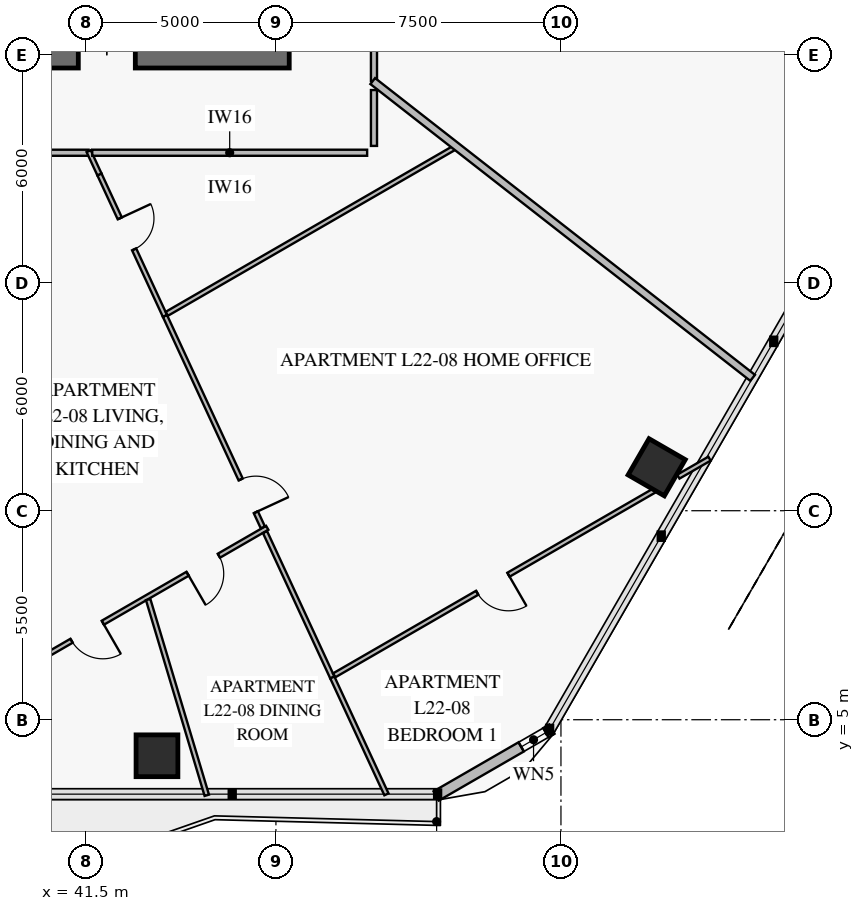
"""IFC4 building model, lengths in metres.
Left out: names, types, materials, properties, quantities, classifications, styles, units other than length and angle.
Written with IfcOpenShell. Run it as: python <this file> out.ifc"""

import sys

from ifc_helpers import new_model, si_unit, direction, frame, frame_2d, origin, origin_2d, place, context, subcontext, project, spatial, rectangle, extrude, element, fill, save


model = new_model("IFC4")
c1 = context("Model", 3, precision=1e-05, world=origin(), true_north=direction((0.0, 1.0)))
c2 = subcontext(c1, "Body", "Model", "MODEL_VIEW")
j1 = project(units=[si_unit("LENGTHUNIT", "METRE"), si_unit("PLANEANGLEUNIT", "RADIAN")], contexts=[c1])
p1 = place(None, origin())
s1 = spatial("IfcSite", under=j1, at=p1, CompositionType="ELEMENT")
p2 = place(p1, origin())
s2 = spatial("IfcBuilding", under=s1, at=p2, CompositionType="ELEMENT")
p3 = place(p2, frame((0.0, 0.0, 92.4)))
s3 = spatial("IfcBuildingStorey", under=s2, at=p3, CompositionType="ELEMENT", Elevation=92.4)
p4 = place(p3, frame((37.35, 22.5, 0.0), z_axis=(0.0, 0.0, 1.0), x_axis=(1.0, 0.0, 0.0)))
e1 = element("IfcWall", 1, at=p4, inside=s3, PredefinedType="SHEAR", context=c2, shape_type="SweptSolid", body=[
    extrude(rectangle(XDim=9.5, YDim=0.7, at=frame_2d((4.75, 0.0))), origin(), (0.0, 0.0, 1.0), 3.8),
])
p5 = place(p4, frame((3.95, 0.0, 0.0)))
e2 = element("IfcOpeningElement", 2, at=p5, cuts=e1, PredefinedType="OPENING", context=c2, shape_type="SweptSolid", body=[
    extrude(rectangle(XDim=1.5, YDim=2.15, at=frame_2d((0.75, 1.075))), frame((0.0, 0.362, 0.0), z_axis=(0.0, -1.0, 0.0), x_axis=(1.0, 0.0, 0.0)), (0.0, 0.0, 1.0), 0.724),
])
for number, where, z_axis, x_axis in (
    (3, (43.37, 4.052, 0.0), (0.0, 0.0, 1.0), (1.0, 0.0, 0.0)),
    (4, (56.519, 11.643, 0.0), (0.0, 0.0, 1.0), (0.5, 0.866, 0.0)),
):
    element("IfcColumn", number, at=place(p3, frame(where, z_axis=z_axis, x_axis=x_axis)), inside=s3, PredefinedType="COLUMN", context=c2, shape_type="SweptSolid", body=[
        extrude(rectangle(XDim=1.1, YDim=1.1, at=origin_2d()), origin(), (0.0, 0.0, 1.0), 3.55),
    ])
p6 = place(p3, frame((53.761, 4.751, 0.0), z_axis=(0.0, 0.0, 1.0), x_axis=(-0.866007452331, -0.500031091541, 0.0)))
e5 = element("IfcWall", 5, at=p6, inside=s3, PredefinedType="SOLIDWALL", context=c2, shape_type="SweptSolid", body=[
    extrude(rectangle(XDim=3.515, YDim=0.28, at=frame_2d((1.757, 0.0))), origin(), (0.0, 0.0, 1.0), 3.55),
])
p7 = place(p6, frame((0.182, 0.0, 0.85)))
e6 = element("IfcOpeningElement", 6, at=p7, cuts=e5, PredefinedType="OPENING", context=c2, shape_type="SweptSolid", body=[
    extrude(rectangle(XDim=0.75, YDim=1.5, at=frame_2d((0.375, 0.75))), frame((0.0, 0.152, 0.0), z_axis=(0.0, -1.0, 0.0), x_axis=(1.0, 0.0, 0.0)), (0.0, 0.0, 1.0), 0.304),
])
p8 = place(p3, frame((39.743, 6.281, 0.0), z_axis=(0.0, 0.0, 1.0), x_axis=(0.866016234862, 0.500015880704, 0.0)))
e7 = element("IfcWall", 7, at=p8, inside=s3, PredefinedType="PARTITIONING", context=c2, shape_type="SweptSolid", body=[
    extrude(rectangle(XDim=7.538, YDim=0.12, at=frame_2d((3.769, 0.0))), origin(), (0.0, 0.0, 1.0), 2.85),
])
p9 = place(p8, frame((1.594, 0.0, 0.0)))
e8 = element("IfcOpeningElement", 8, at=p9, cuts=e7, PredefinedType="OPENING", context=c2, shape_type="SweptSolid", body=[
    extrude(rectangle(XDim=0.95, YDim=2.1, at=frame_2d((0.475, 1.05))), frame((0.0, 0.072, 0.0), z_axis=(0.0, -1.0, 0.0), x_axis=(1.0, 0.0, 0.0)), (0.0, 0.0, 1.0), 0.144),
])
p10 = place(p8, frame((5.12, 0.0, 0.0)))
e9 = element("IfcOpeningElement", 9, at=p10, cuts=e7, PredefinedType="OPENING", context=c2, shape_type="SweptSolid", body=[
    extrude(rectangle(XDim=0.95, YDim=2.1, at=frame_2d((0.475, 1.05))), frame((0.0, 0.072, 0.0), z_axis=(0.0, -1.0, 0.0), x_axis=(1.0, 0.0, 0.0)), (0.0, 0.0, 1.0), 0.144),
])
p11 = place(p3, frame((41.856, 19.35, 0.0), z_axis=(0.0, 0.0, 1.0), x_axis=(0.420102705712, -0.907476565347, 0.0)))
e10 = element("IfcWall", 10, at=p11, inside=s3, PredefinedType="PARTITIONING", context=c2, shape_type="SweptSolid", body=[
    extrude(rectangle(XDim=4.105, YDim=0.12, at=frame_2d((2.052, 0.0))), origin(), (0.0, 0.0, 1.0), 3.55),
])
p12 = place(p11, frame((1.274, 0.0, 0.0)))
e11 = element("IfcOpeningElement", 11, at=p12, cuts=e10, PredefinedType="OPENING", context=c2, shape_type="SweptSolid", body=[
    extrude(rectangle(XDim=0.9, YDim=2.1, at=frame_2d((0.45, 1.05))), frame((0.0, 0.072, 0.0), z_axis=(0.0, -1.0, 0.0), x_axis=(1.0, 0.0, 0.0)), (0.0, 0.0, 1.0), 0.144),
])
p13 = place(p3, frame((43.58, 15.625, 0.0), z_axis=(0.0, 0.0, 1.0), x_axis=(0.420105955841, -0.907475060741, 0.0)))
e12 = element("IfcWall", 12, at=p13, inside=s3, PredefinedType="PARTITIONING", context=c2, shape_type="SweptSolid", body=[
    extrude(rectangle(XDim=6.13, YDim=0.12, at=frame_2d((3.065, 0.0))), origin(), (0.0, 0.0, 1.0), 3.1),
])
p14 = place(p13, frame((4.742, 0.0, 0.0)))
e13 = element("IfcOpeningElement", 13, at=p14, cuts=e12, PredefinedType="OPENING", context=c2, shape_type="SweptSolid", body=[
    extrude(rectangle(XDim=0.95, YDim=2.1, at=frame_2d((0.475, 1.05))), frame((0.0, 0.072, 0.0), z_axis=(0.0, -1.0, 0.0), x_axis=(1.0, 0.0, 0.0)), (0.0, 0.0, 1.0), 0.144),
])
p15 = place(p3, frame((46.213, 9.938, 0.0), z_axis=(0.0, 0.0, 1.0), x_axis=(0.420052931111, -0.907499606096, 0.0)))
e14 = element("IfcWall", 14, at=p15, inside=s3, PredefinedType="PARTITIONING", context=c2, shape_type="SweptSolid", body=[
    extrude(rectangle(XDim=4.217, YDim=0.12, at=frame_2d((2.108, 0.0))), origin(), (0.0, 0.0, 1.0), 2.8),
])
p16 = place(p3, frame((48.033, 6.168, 0.0), z_axis=(0.0, 0.0, 1.0), x_axis=(0.866038464595, 0.49997737733, 0.0)))
e15 = element("IfcWall", 15, at=p16, inside=s3, PredefinedType="PARTITIONING", context=c2, shape_type="SweptSolid", body=[
    extrude(rectangle(XDim=9.81, YDim=0.12, at=frame_2d((4.905, 0.0))), origin(), (0.0, 0.0, 1.0), 3.55),
])
p17 = place(p16, frame((4.346, 0.0, 0.0)))
e16 = element("IfcOpeningElement", 16, at=p17, cuts=e15, PredefinedType="OPENING", context=c2, shape_type="SweptSolid", body=[
    extrude(rectangle(XDim=0.95, YDim=2.1, at=frame_2d((0.475, 1.05))), frame((0.0, 0.072, 0.0), z_axis=(0.0, -1.0, 0.0), x_axis=(1.0, 0.0, 0.0)), (0.0, 0.0, 1.0), 0.144),
])
p18 = place(p3, frame((37.826, 19.92, 0.0), z_axis=(0.0, 0.0, 1.0), x_axis=(1.0, 0.0, 0.0)))
e17 = element("IfcWall", 17, at=p18, inside=s3, PredefinedType="PARTITIONING", context=c2, shape_type="SweptSolid", body=[
    extrude(rectangle(XDim=3.744, YDim=0.16, at=frame_2d((1.872, 0.0))), origin(), (0.0, 0.0, 1.0), 2.85),
])
p19 = place(p18, frame((1.347, 0.0, 0.0)))
e18 = element("IfcOpeningElement", 18, at=p19, cuts=e17, PredefinedType="OPENING", context=c2, shape_type="SweptSolid", body=[
    extrude(rectangle(XDim=1.05, YDim=2.15, at=frame_2d((0.525, 1.075))), frame((0.0, 0.092, 0.0), z_axis=(0.0, -1.0, 0.0), x_axis=(1.0, 0.0, 0.0)), (0.0, 0.0, 1.0), 0.184),
])
p20 = place(p3, frame((49.08, 21.806, 0.0), z_axis=(0.0, 0.0, 1.0), x_axis=(0.0, 1.0, 0.0)))
e19 = element("IfcWall", 19, at=p20, inside=s3, PredefinedType="PARTITIONING", context=c2, shape_type="SweptSolid", body=[
    extrude(rectangle(XDim=11.088, YDim=0.16, at=frame_2d((5.544, 0.0))), origin(), (0.0, 0.0, 1.0), 2.85),
])
p21 = place(p20, frame((4.969, 0.0, 0.0)))
e20 = element("IfcOpeningElement", 20, at=p21, cuts=e19, PredefinedType="OPENING", context=c2, shape_type="SweptSolid", body=[
    extrude(rectangle(XDim=1.15, YDim=2.2, at=frame_2d((0.575, 1.1))), frame((0.0, 0.092, 0.0), z_axis=(0.0, -1.0, 0.0), x_axis=(1.0, 0.0, 0.0)), (0.0, 0.0, 1.0), 0.184),
])
p22 = place(p3, frame((43.138, 8.163, 0.0), z_axis=(0.0, 0.0, 1.0), x_axis=(0.286848011089, -0.957976105409, 0.0)))
e21 = element("IfcWall", 21, at=p22, inside=s3, PredefinedType="PARTITIONING", context=c2, shape_type="SweptSolid", body=[
    extrude(rectangle(XDim=5.377, YDim=0.12, at=frame_2d((2.689, 0.0))), origin(), (0.0, 0.0, 1.0), 2.8),
])
p23 = place(p3, frame((41.572, 19.963, 0.0), z_axis=(0.0, 0.0, 1.0), x_axis=(0.419952560089, -0.907546057936, 0.0)))
e22 = element("IfcWall", 22, at=p23, inside=s3, PredefinedType="PARTITIONING", context=c2, shape_type="SweptSolid", body=[
    extrude(rectangle(XDim=0.675, YDim=0.12, at=frame_2d((0.337, 0.0))), origin(), (0.0, 0.0, 1.0), 3.55),
])
p24 = place(p3, frame((47.984, 6.111, 0.0), z_axis=(0.0, 0.0, 1.0), x_axis=(0.420090602043, -0.907482168461, 0.0)))
e23 = element("IfcWall", 23, at=p24, inside=s3, PredefinedType="PARTITIONING", context=c2, shape_type="SweptSolid", body=[
    extrude(rectangle(XDim=3.388, YDim=0.12, at=frame_2d((1.694, 0.0))), origin(), (0.0, 0.0, 1.0), 3.55),
])
p25 = place(p3, frame((43.629, 15.682, 0.0), z_axis=(0.0, 0.0, 1.0), x_axis=(0.866026296779, 0.499998453285, 0.0)))
e24 = element("IfcWall", 24, at=p25, inside=s3, PredefinedType="PARTITIONING", context=c2, shape_type="SweptSolid", body=[
    extrude(rectangle(XDim=8.729, YDim=0.12, at=frame_2d((4.365, 0.0))), origin(), (0.0, 0.0, 1.0), 2.85),
])
p26 = place(p3, frame((57.089, 11.397, 0.0), z_axis=(0.0, 0.0, 1.0), x_axis=(0.866043818878, 0.499968102766, 0.0)))
e25 = element("IfcWall", 25, at=p26, inside=s3, PredefinedType="PARTITIONING", context=c2, shape_type="SweptSolid", body=[
    extrude(rectangle(XDim=0.946, YDim=0.12, at=frame_2d((0.473, 0.0))), origin(), (0.0, 0.0, 1.0), 3.55),
])
p27 = place(p3, frame((49.047, 21.806, 0.0), z_axis=(0.0, 0.0, 1.0), x_axis=(0.788008325787, -0.61566458278, 0.0)))
e26 = element("IfcWall", 26, at=p27, inside=s3, PredefinedType="PARTITIONING", context=c2, shape_type="SweptSolid", body=[
    extrude(rectangle(XDim=12.686, YDim=0.2, at=frame_2d((6.343, 0.0))), origin(), (0.0, 0.0, 1.0), 2.8),
])
p28 = place(p3, frame((41.667, 19.92, 0.0), z_axis=(0.0, 0.0, 1.0), x_axis=(1.0, 0.0, 0.0)))
e27 = element("IfcWall", 27, at=p28, inside=s3, PredefinedType="PARTITIONING", context=c2, shape_type="SweptSolid", body=[
    extrude(rectangle(XDim=7.233, YDim=0.16, at=frame_2d((3.616, 0.0))), origin(), (0.0, 0.0, 1.0), 2.85),
])
p29 = place(p3, frame((49.08, 20.1, 0.0), z_axis=(0.0, 0.0, 1.0), x_axis=(0.0, 1.0, 0.0)))
e28 = element("IfcWall", 28, at=p29, inside=s3, PredefinedType="PARTITIONING", context=c2, shape_type="SweptSolid", body=[
    extrude(rectangle(XDim=1.47, YDim=0.16, at=frame_2d((0.735, 0.0))), origin(), (0.0, 0.0, 1.0), 3.55),
])
p30 = place(p7, origin())
e29 = element("IfcWindow", 29, at=p30, inside=s3, PartitioningType="SINGLE_PANEL", PredefinedType="WINDOW", context=c2, shape_type="SweptSolid", body=[
    extrude(rectangle(XDim=0.75, YDim=1.5, at=frame_2d((0.375, 0.75))), frame((0.0, 0.03, 0.0), z_axis=(0.0, -1.0, 0.0), x_axis=(1.0, 0.0, 0.0)), (0.0, 0.0, 1.0), 0.06),
])
fill(e6, e29)
p31 = place(p5, origin())
e30 = element("IfcDoor", 30, at=p31, inside=s3, OperationType="DOUBLE_DOOR_SINGLE_SWING", PredefinedType="DOOR", context=c2, shape_type="SweptSolid", body=[
    extrude(rectangle(XDim=1.5, YDim=2.15, at=frame_2d((0.75, 1.075))), frame((0.0, 0.025, 0.0), z_axis=(0.0, -1.0, 0.0), x_axis=(1.0, 0.0, 0.0)), (0.0, 0.0, 1.0), 0.05),
])
fill(e2, e30)
p32 = place(p9, frame((0.95, 0.0, 0.0), z_axis=(0.0, 0.0, 1.0), x_axis=(-1.0, 0.0, 0.0)))
e31 = element("IfcDoor", 31, at=p32, inside=s3, OperationType="SINGLE_SWING_LEFT", PredefinedType="DOOR", context=c2, shape_type="SweptSolid", body=[
    extrude(rectangle(XDim=0.95, YDim=2.1, at=frame_2d((0.475, 1.05))), frame((0.0, 0.025, 0.0), z_axis=(0.0, -1.0, 0.0), x_axis=(1.0, 0.0, 0.0)), (0.0, 0.0, 1.0), 0.05),
])
fill(e8, e31)
p33 = place(p10, frame((0.95, 0.0, 0.0), z_axis=(0.0, 0.0, 1.0), x_axis=(-1.0, 0.0, 0.0)))
e32 = element("IfcDoor", 32, at=p33, inside=s3, OperationType="SINGLE_SWING_RIGHT", PredefinedType="DOOR", context=c2, shape_type="SweptSolid", body=[
    extrude(rectangle(XDim=0.95, YDim=2.1, at=frame_2d((0.475, 1.05))), frame((0.0, 0.025, 0.0), z_axis=(0.0, -1.0, 0.0), x_axis=(1.0, 0.0, 0.0)), (0.0, 0.0, 1.0), 0.05),
])
fill(e9, e32)
p34 = place(p12, origin())
e33 = element("IfcDoor", 33, at=p34, inside=s3, OperationType="SINGLE_SWING_LEFT", PredefinedType="DOOR", context=c2, shape_type="SweptSolid", body=[
    extrude(rectangle(XDim=0.9, YDim=2.1, at=frame_2d((0.45, 1.05))), frame((0.0, 0.025, 0.0), z_axis=(0.0, -1.0, 0.0), x_axis=(1.0, 0.0, 0.0)), (0.0, 0.0, 1.0), 0.05),
])
fill(e11, e33)
p35 = place(p14, origin())
e34 = element("IfcDoor", 34, at=p35, inside=s3, OperationType="SINGLE_SWING_RIGHT", PredefinedType="DOOR", context=c2, shape_type="SweptSolid", body=[
    extrude(rectangle(XDim=0.95, YDim=2.1, at=frame_2d((0.475, 1.05))), frame((0.0, 0.025, 0.0), z_axis=(0.0, -1.0, 0.0), x_axis=(1.0, 0.0, 0.0)), (0.0, 0.0, 1.0), 0.05),
])
fill(e13, e34)
p36 = place(p17, frame((0.95, 0.0, 0.0), z_axis=(0.0, 0.0, 1.0), x_axis=(-1.0, 0.0, 0.0)))
e35 = element("IfcDoor", 35, at=p36, inside=s3, OperationType="SINGLE_SWING_LEFT", PredefinedType="DOOR", context=c2, shape_type="SweptSolid", body=[
    extrude(rectangle(XDim=0.95, YDim=2.1, at=frame_2d((0.475, 1.05))), frame((0.0, 0.025, 0.0), z_axis=(0.0, -1.0, 0.0), x_axis=(1.0, 0.0, 0.0)), (0.0, 0.0, 1.0), 0.05),
])
fill(e16, e35)
save(model, sys.argv[1])
